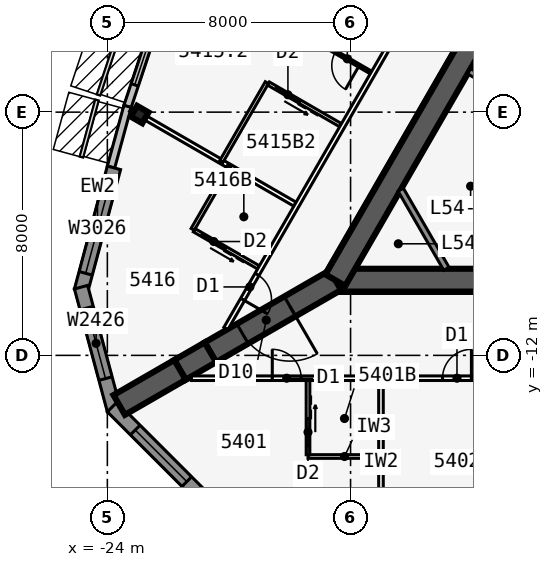
"""IFC4 building model, lengths in metres.
Left out: names, types, materials, properties, quantities, classifications, styles, units other than length and angle.
Written with IfcOpenShell. Run it as: python <this file> out.ifc"""

import sys

from ifc_helpers import new_model, si_unit, direction, frame, frame_2d, origin, origin_2d, place, context, subcontext, project, spatial, polyline, rectangle, i_section, outline, extrude, element, fill, save


model = new_model("IFC4")
c1 = context("Model", 3, precision=1e-05, world=origin(), true_north=direction((0.0, 1.0)))
c2 = subcontext(c1, "Body", "Model", "MODEL_VIEW")
j1 = project(units=[si_unit("LENGTHUNIT", "METRE"), si_unit("PLANEANGLEUNIT", "RADIAN")], contexts=[c1])
p1 = place(None, origin())
s1 = spatial("IfcSite", under=j1, at=p1, CompositionType="ELEMENT")
p2 = place(p1, origin())
s2 = spatial("IfcBuilding", under=s1, at=p2, CompositionType="ELEMENT")
p3 = place(p2, frame((0.0, 0.0, 204.5)))
s3 = spatial("IfcBuildingStorey", under=s2, at=p3, CompositionType="ELEMENT", Elevation=204.5)
p4 = place(p3, frame((-16.5, -9.526, 0.0), z_axis=(0.0, 0.0, 1.0), x_axis=(1.0, 0.0, 0.0)))
e1 = element("IfcWall", 1, at=p4, inside=s3, PredefinedType="SHEAR", context=c2, shape_type="SweptSolid", body=[
    extrude(rectangle(XDim=33.0, YDim=0.75, at=frame_2d((16.5, 0.0))), origin(), (0.0, 0.0, 1.0), 3.6),
])
p5 = place(p4, frame((14.05, 0.0, 0.0)))
e2 = element("IfcOpeningElement", 2, at=p5, cuts=e1, PredefinedType="OPENING", context=c2, shape_type="SweptSolid", body=[
    extrude(rectangle(XDim=1.8, YDim=2.13, at=frame_2d((0.9, 1.065))), frame((0.0, 0.385, 0.0), z_axis=(0.0, -1.0, 0.0), x_axis=(1.0, 0.0, 0.0)), (0.0, 0.0, 1.0), 0.77),
])
p6 = place(p3, frame((0.0, 19.052, 0.0), z_axis=(0.0, 0.0, 1.0), x_axis=(-0.499999749417, -0.866025548458, 0.0)))
e3 = element("IfcWall", 3, at=p6, inside=s3, PredefinedType="SHEAR", context=c2, shape_type="SweptSolid", body=[
    extrude(rectangle(XDim=33.0, YDim=0.75, at=frame_2d((16.5, 0.0))), origin(), (0.0, 0.0, 1.0), 3.6),
])
p7 = place(p6, frame((14.15, 0.0, 0.0)))
e4 = element("IfcOpeningElement", 4, at=p7, cuts=e3, PredefinedType="OPENING", context=c2, shape_type="SweptSolid", body=[
    extrude(rectangle(XDim=1.8, YDim=2.13, at=frame_2d((0.9, 1.065))), frame((0.0, 0.385, 0.0), z_axis=(0.0, -1.0, 0.0), x_axis=(1.0, 0.0, 0.0)), (0.0, 0.0, 1.0), 0.77),
])
p8 = place(p6, frame((12.6, 0.0, 0.0)))
e5 = element("IfcOpeningElement", 5, at=p8, cuts=e3, PredefinedType="OPENING", context=c2, shape_type="SweptSolid", body=[
    extrude(rectangle(XDim=1.0, YDim=2.13, at=frame_2d((0.5, 1.065))), frame((0.0, 0.385, 0.0), z_axis=(0.0, -1.0, 0.0), x_axis=(1.0, 0.0, 0.0)), (0.0, 0.0, 1.0), 0.77),
])
p9 = place(p3, frame((-9.329, -4.256, 0.0), z_axis=(0.0, 0.0, 1.0), x_axis=(-0.866022944154, 0.50000426018, 0.0)))
e6 = element("IfcWall", 6, at=p9, inside=s3, PredefinedType="SOLIDWALL", context=c2, shape_type="SweptSolid", body=[
    extrude(rectangle(XDim=3.2, YDim=0.2, at=frame_2d((1.6, 0.0))), origin(), (0.0, 0.0, 1.0), 3.435),
])
p10 = place(p3, frame((-16.5, -9.526, 0.0), z_axis=(0.0, 0.0, 1.0), x_axis=(-0.866031398331, -0.499989616998, 0.0)))
e7 = element("IfcWall", 7, at=p10, inside=s3, PredefinedType="SHEAR", context=c2, shape_type="SweptSolid", body=[
    extrude(rectangle(XDim=4.746, YDim=0.75, at=frame_2d((2.373, 0.0))), origin(), (0.0, 0.0, 1.0), 3.6),
])
p11 = place(p10, frame((1.725, 0.0, 0.0)))
e8 = element("IfcOpeningElement", 8, at=p11, cuts=e7, PredefinedType="OPENING", context=c2, shape_type="SweptSolid", body=[
    extrude(rectangle(XDim=1.8, YDim=2.13, at=frame_2d((0.9, 1.065))), frame((0.0, 0.385, 0.0), z_axis=(0.0, -1.0, 0.0), x_axis=(1.0, 0.0, 0.0)), (0.0, 0.0, 1.0), 0.77),
])
p12 = place(p3, frame((-20.61, -11.899, 0.0), z_axis=(0.0, 0.0, 1.0), x_axis=(-0.866009537788, -0.500027479704, 0.0)))
e9 = element("IfcWall", 9, at=p12, inside=s3, PredefinedType="SHEAR", context=c2, shape_type="SweptSolid", body=[
    extrude(rectangle(XDim=1.155, YDim=0.75, at=frame_2d((0.577, 0.0))), origin(), (0.0, 0.0, 1.0), 3.6),
])
p13 = place(p3, frame((-21.61, -12.477, 0.0), z_axis=(0.0, 0.0, 1.0), x_axis=(-0.866055313784, -0.499948190782, 0.0)))
e10 = element("IfcWall", 10, at=p13, inside=s3, PredefinedType="SHEAR", context=c2, shape_type="SweptSolid", body=[
    extrude(rectangle(XDim=2.309, YDim=0.75, at=frame_2d((1.155, 0.0))), origin(), (0.0, 0.0, 1.0), 3.6),
])
p14 = place(p3, frame((-22.937, -4.078, 0.0), z_axis=(0.0, 0.0, 1.0), x_axis=(-0.5, -0.866025403784, 0.0)))
e11 = element("IfcColumn", 11, at=p14, inside=s3, PredefinedType="COLUMN", context=c2, shape_type="SweptSolid", body=[
    extrude(i_section(OverallWidth=0.411, OverallDepth=0.434, WebThickness=0.036, FlangeThickness=0.057, at=origin_2d()), origin(), (0.0, 0.0, 1.0), 3.6),
])
p15 = place(p3, frame((-21.729, 1.028, 0.0), z_axis=(0.0, 0.0, 1.0), x_axis=(-0.315108478109, -0.949055660656, 0.0)))
e12 = element("IfcWall", 12, at=p15, inside=s3, PredefinedType="STANDARD", context=c2, shape_type="SweptSolid", body=[
    extrude(rectangle(XDim=5.105, YDim=0.25, at=frame_2d((2.552, 0.0))), origin(), (0.0, 0.0, 1.0), 3.435),
])
p16 = place(p15, frame((0.752, 0.0, 0.45)))
e13 = element("IfcOpeningElement", 13, at=p16, cuts=e12, PredefinedType="OPENING", context=c2, shape_type="SweptSolid", body=[
    extrude(rectangle(XDim=3.6, YDim=2.6, at=frame_2d((1.8, 1.3))), frame((0.0, 0.135, 0.0), z_axis=(0.0, -1.0, 0.0), x_axis=(1.0, 0.0, 0.0)), (0.0, 0.0, 1.0), 0.27),
])
p17 = place(p3, frame((-23.336, -3.811, 0.0), z_axis=(0.0, 0.0, 1.0), x_axis=(-0.262867703986, -0.964831887015, 0.0)))
e14 = element("IfcWall", 14, at=p17, inside=s3, PredefinedType="STANDARD", context=c2, shape_type="SweptSolid", body=[
    extrude(rectangle(XDim=2.068, YDim=0.25, at=frame_2d((1.034, 0.0))), origin(), (0.0, 0.0, 1.0), 3.435),
])
p18 = place(p3, frame((-23.783, -5.832, 0.0), z_axis=(0.0, 0.0, 1.0), x_axis=(-0.258784695888, -0.965935029479, 0.0)))
e15 = element("IfcWall", 15, at=p18, inside=s3, PredefinedType="SOLIDWALL", context=c2, shape_type="SweptSolid", body=[
    extrude(rectangle(XDim=4.184, YDim=0.45, at=frame_2d((2.092, 0.0))), origin(), (0.0, 0.0, 1.0), 3.435),
])
p19 = place(p18, frame((0.592, 0.0, 0.45)))
e16 = element("IfcOpeningElement", 16, at=p19, cuts=e15, PredefinedType="OPENING", context=c2, shape_type="SweptSolid", body=[
    extrude(rectangle(XDim=3.0, YDim=2.6, at=frame_2d((1.5, 1.3))), frame((0.0, 0.235, 0.0), z_axis=(0.0, -1.0, 0.0), x_axis=(1.0, 0.0, 0.0)), (0.0, 0.0, 1.0), 0.47),
])
p20 = place(p3, frame((-24.865, -9.757, 0.0), z_axis=(0.0, 0.0, 1.0), x_axis=(0.258799282522, -0.96593112144, 0.0)))
e17 = element("IfcWall", 17, at=p20, inside=s3, PredefinedType="SOLIDWALL", context=c2, shape_type="SweptSolid", body=[
    extrude(outline(polyline([(4.184, 0.225), (4.125, 0.225), (3.705, 0.113), (3.675, 0.225), (0.0, 0.225), (0.0, -0.225), (4.184, -0.225), (4.184, 0.225)])), origin(), (0.0, 0.0, 1.0), 3.435),
])
p21 = place(p20, frame((0.713, 0.0, 0.45)))
e18 = element("IfcOpeningElement", 18, at=p21, cuts=e17, PredefinedType="OPENING", context=c2, shape_type="SweptSolid", body=[
    extrude(rectangle(XDim=2.4, YDim=2.6, at=frame_2d((1.2, 1.3))), frame((0.0, 0.235, 0.0), z_axis=(0.0, -1.0, 0.0), x_axis=(1.0, 0.0, 0.0)), (0.0, 0.0, 1.0), 0.47),
])
p22 = place(p3, frame((-23.841, -13.697, 0.0), z_axis=(0.0, 0.0, 1.0), x_axis=(0.707077605902, -0.707135955267, 0.0)))
e19 = element("IfcWall", 19, at=p22, inside=s3, PredefinedType="SOLIDWALL", context=c2, shape_type="SweptSolid", body=[
    extrude(outline(polyline([(4.184, 0.225), (0.509, 0.225), (0.479, 0.113), (0.059, 0.225), (0.0, 0.225), (0.0, -0.225), (4.184, -0.225), (4.184, 0.225)])), origin(), (0.0, 0.0, 1.0), 3.435),
])
p23 = place(p22, frame((1.071, 0.0, 0.45)))
e20 = element("IfcOpeningElement", 20, at=p23, cuts=e19, PredefinedType="OPENING", context=c2, shape_type="SweptSolid", body=[
    extrude(rectangle(XDim=2.4, YDim=2.6, at=frame_2d((1.2, 1.3))), frame((0.0, 0.235, 0.0), z_axis=(0.0, -1.0, 0.0), x_axis=(1.0, 0.0, 0.0)), (0.0, 0.0, 1.0), 0.47),
])
p24 = place(p3, frame((-21.236, -12.751, 0.0), z_axis=(0.0, 0.0, 1.0), x_axis=(1.0, 0.0, 0.0)))
e21 = element("IfcWall", 21, at=p24, inside=s3, PredefinedType="PARTITIONING", context=c2, shape_type="SweptSolid", body=[
    extrude(rectangle(XDim=42.472, YDim=0.15, at=frame_2d((21.236, 0.0))), origin(), (0.0, 0.0, 1.0), 3.435),
])
p25 = place(p24, frame((2.661, 0.0, 0.0)))
e22 = element("IfcOpeningElement", 22, at=p25, cuts=e21, PredefinedType="OPENING", context=c2, shape_type="SweptSolid", body=[
    extrude(rectangle(XDim=0.95, YDim=2.13, at=frame_2d((0.475, 1.065))), frame((0.0, 0.085, 0.0), z_axis=(0.0, -1.0, 0.0), x_axis=(1.0, 0.0, 0.0)), (0.0, 0.0, 1.0), 0.17),
])
p26 = place(p24, frame((8.261, 0.0, 0.0)))
e23 = element("IfcOpeningElement", 23, at=p26, cuts=e21, PredefinedType="OPENING", context=c2, shape_type="SweptSolid", body=[
    extrude(rectangle(XDim=0.95, YDim=2.13, at=frame_2d((0.475, 1.065))), frame((0.0, 0.085, 0.0), z_axis=(0.0, -1.0, 0.0), x_axis=(1.0, 0.0, 0.0)), (0.0, 0.0, 1.0), 0.17),
])
p27 = place(p24, frame((18.861, 0.0, 0.0)))
e24 = element("IfcOpeningElement", 24, at=p27, cuts=e21, PredefinedType="OPENING", context=c2, shape_type="SweptSolid", body=[
    extrude(rectangle(XDim=0.95, YDim=2.13, at=frame_2d((0.475, 1.065))), frame((0.0, 0.085, 0.0), z_axis=(0.0, -1.0, 0.0), x_axis=(1.0, 0.0, 0.0)), (0.0, 0.0, 1.0), 0.17),
])
p28 = place(p24, frame((23.236, 0.0, 0.0)))
e25 = element("IfcOpeningElement", 25, at=p28, cuts=e21, PredefinedType="OPENING", context=c2, shape_type="SweptSolid", body=[
    extrude(rectangle(XDim=1.0, YDim=2.13, at=frame_2d((0.5, 1.065))), frame((0.0, 0.085, 0.0), z_axis=(0.0, -1.0, 0.0), x_axis=(1.0, 0.0, 0.0)), (0.0, 0.0, 1.0), 0.17),
])
p29 = place(p24, frame((29.461, 0.0, 0.0)))
e26 = element("IfcOpeningElement", 26, at=p29, cuts=e21, PredefinedType="OPENING", context=c2, shape_type="SweptSolid", body=[
    extrude(rectangle(XDim=0.95, YDim=2.13, at=frame_2d((0.475, 1.065))), frame((0.0, 0.085, 0.0), z_axis=(0.0, -1.0, 0.0), x_axis=(1.0, 0.0, 0.0)), (0.0, 0.0, 1.0), 0.17),
])
p30 = place(p24, frame((38.861, 0.0, 0.0)))
e27 = element("IfcOpeningElement", 27, at=p30, cuts=e21, PredefinedType="OPENING", context=c2, shape_type="SweptSolid", body=[
    extrude(rectangle(XDim=0.95, YDim=2.13, at=frame_2d((0.475, 1.065))), frame((0.0, 0.085, 0.0), z_axis=(0.0, -1.0, 0.0), x_axis=(1.0, 0.0, 0.0)), (0.0, 0.0, 1.0), 0.17),
])
p31 = place(p3, frame((-15.0, -12.826, 0.0), z_axis=(0.0, 0.0, 1.0), x_axis=(0.0, -1.0, 0.0)))
e28 = element("IfcWall", 28, at=p31, inside=s3, PredefinedType="PARTITIONING", context=c2, shape_type="SweptSolid", body=[
    extrude(rectangle(XDim=5.34, YDim=0.15, at=frame_2d((2.67, 0.0))), origin(), (0.0, 0.0, 1.0), 2.589),
])
p32 = place(p3, frame((-17.4, -15.326, 0.0), z_axis=(0.0, 0.0, 1.0), x_axis=(1.0, 0.0, 0.0)))
e29 = element("IfcWall", 29, at=p32, inside=s3, PredefinedType="PLUMBINGWALL", context=c2, shape_type="SweptSolid", body=[
    extrude(rectangle(XDim=2.4, YDim=0.12, at=frame_2d((1.2, 0.0))), origin(), (0.0, 0.0, 1.0), 3.435),
])
p33 = place(p3, frame((-17.4, -12.826, 0.0), z_axis=(0.0, 0.0, 1.0), x_axis=(0.0, -1.0, 0.0)))
e30 = element("IfcWall", 30, at=p33, inside=s3, PredefinedType="PLUMBINGWALL", context=c2, shape_type="SweptSolid", body=[
    extrude(rectangle(XDim=2.44, YDim=0.12, at=frame_2d((1.22, 0.0))), origin(), (0.0, 0.0, 1.0), 3.435),
])
p34 = place(p33, frame((1.25, 0.0, 0.0)))
e31 = element("IfcOpeningElement", 31, at=p34, cuts=e30, PredefinedType="OPENING", context=c2, shape_type="SweptSolid", body=[
    extrude(rectangle(XDim=0.9, YDim=2.13, at=frame_2d((0.45, 1.065))), frame((0.0, 0.07, 0.0), z_axis=(0.0, -1.0, 0.0), x_axis=(1.0, 0.0, 0.0)), (0.0, 0.0, 1.0), 0.14),
])
p35 = place(p3, frame((-0.425, 22.966, 0.0), z_axis=(0.0, 0.0, 1.0), x_axis=(-0.500000265775, -0.866025250339, 0.0)))
e32 = element("IfcWall", 32, at=p35, inside=s3, PredefinedType="PARTITIONING", context=c2, shape_type="SweptSolid", body=[
    extrude(rectangle(XDim=39.354, YDim=0.15, at=frame_2d((19.677, 0.0))), origin(), (0.0, 0.0, 1.0), 3.435),
])
p36 = place(p35, frame((1.102, 0.0, 0.0)))
e33 = element("IfcOpeningElement", 33, at=p36, cuts=e32, PredefinedType="OPENING", context=c2, shape_type="SweptSolid", body=[
    extrude(rectangle(XDim=0.95, YDim=2.13, at=frame_2d((0.475, 1.065))), frame((0.0, 0.085, 0.0), z_axis=(0.0, -1.0, 0.0), x_axis=(1.0, 0.0, 0.0)), (0.0, 0.0, 1.0), 0.17),
])
p37 = place(p35, frame((7.902, 0.0, 0.0)))
e34 = element("IfcOpeningElement", 34, at=p37, cuts=e32, PredefinedType="OPENING", context=c2, shape_type="SweptSolid", body=[
    extrude(rectangle(XDim=0.95, YDim=2.13, at=frame_2d((0.475, 1.065))), frame((0.0, 0.085, 0.0), z_axis=(0.0, -1.0, 0.0), x_axis=(1.0, 0.0, 0.0)), (0.0, 0.0, 1.0), 0.17),
])
p38 = place(p35, frame((17.302, 0.0, 0.0)))
e35 = element("IfcOpeningElement", 35, at=p38, cuts=e32, PredefinedType="OPENING", context=c2, shape_type="SweptSolid", body=[
    extrude(rectangle(XDim=0.95, YDim=2.13, at=frame_2d((0.475, 1.065))), frame((0.0, 0.085, 0.0), z_axis=(0.0, -1.0, 0.0), x_axis=(1.0, 0.0, 0.0)), (0.0, 0.0, 1.0), 0.17),
])
p39 = place(p35, frame((26.702, 0.0, 0.0)))
e36 = element("IfcOpeningElement", 36, at=p39, cuts=e32, PredefinedType="OPENING", context=c2, shape_type="SweptSolid", body=[
    extrude(rectangle(XDim=0.95, YDim=2.13, at=frame_2d((0.475, 1.065))), frame((0.0, 0.085, 0.0), z_axis=(0.0, -1.0, 0.0), x_axis=(1.0, 0.0, 0.0)), (0.0, 0.0, 1.0), 0.17),
])
p40 = place(p35, frame((37.302, 0.0, 0.0)))
e37 = element("IfcOpeningElement", 37, at=p40, cuts=e32, PredefinedType="OPENING", context=c2, shape_type="SweptSolid", body=[
    extrude(rectangle(XDim=0.95, YDim=2.13, at=frame_2d((0.475, 1.065))), frame((0.0, 0.085, 0.0), z_axis=(0.0, -1.0, 0.0), x_axis=(1.0, 0.0, 0.0)), (0.0, 0.0, 1.0), 0.17),
])
p41 = place(p3, frame((-15.329, -2.697, 0.0), z_axis=(0.0, 0.0, 1.0), x_axis=(-0.866032413668, 0.499987858329, 0.0)))
e38 = element("IfcWall", 38, at=p41, inside=s3, PredefinedType="PARTITIONING", context=c2, shape_type="SweptSolid", body=[
    extrude(rectangle(XDim=7.273, YDim=0.1, at=frame_2d((3.636, 0.0))), origin(), (0.0, 0.0, 1.0), 2.589),
])
p42 = place(p41, frame((0.45, 0.0, 0.0)))
e39 = element("IfcOpeningElement", 39, at=p42, cuts=e38, PredefinedType="OPENING", context=c2, shape_type="SweptSolid", body=[
    extrude(rectangle(XDim=0.9, YDim=2.13, at=frame_2d((0.45, 1.065))), frame((0.0, 0.06, 0.0), z_axis=(0.0, -1.0, 0.0), x_axis=(1.0, 0.0, 0.0)), (0.0, 0.0, 1.0), 0.12),
])
p43 = place(p3, frame((-17.829, -7.027, 0.0), z_axis=(0.0, 0.0, 1.0), x_axis=(-0.866026604282, 0.499997920671, 0.0)))
e40 = element("IfcWall", 40, at=p43, inside=s3, PredefinedType="PARTITIONING", context=c2, shape_type="SweptSolid", body=[
    extrude(rectangle(XDim=6.24, YDim=0.15, at=frame_2d((3.12, 0.0))), origin(), (0.0, 0.0, 1.0), 2.589),
])
p44 = place(p3, frame((-18.753, -3.029, 0.0), z_axis=(0.0, 0.0, 1.0), x_axis=(-0.50002537861, -0.866010750942, 0.0)))
e41 = element("IfcWall", 41, at=p44, inside=s3, PredefinedType="PLUMBINGWALL", context=c2, shape_type="SweptSolid", body=[
    extrude(rectangle(XDim=3.0, YDim=0.12, at=frame_2d((1.5, 0.0))), origin(), (0.0, 0.0, 1.0), 3.435),
])
p45 = place(p3, frame((-16.329, -4.429, 0.0), z_axis=(0.0, 0.0, 1.0), x_axis=(-0.865997131366, 0.500048966069, 0.0)))
e42 = element("IfcWall", 42, at=p45, inside=s3, PredefinedType="PLUMBINGWALL", context=c2, shape_type="SweptSolid", body=[
    extrude(rectangle(XDim=2.74, YDim=0.12, at=frame_2d((1.37, 0.0))), origin(), (0.0, 0.0, 1.0), 3.435),
])
p46 = place(p45, frame((1.55, 0.0, 0.0)))
e43 = element("IfcOpeningElement", 43, at=p46, cuts=e42, PredefinedType="OPENING", context=c2, shape_type="SweptSolid", body=[
    extrude(rectangle(XDim=0.9, YDim=2.13, at=frame_2d((0.45, 1.065))), frame((0.0, 0.07, 0.0), z_axis=(0.0, -1.0, 0.0), x_axis=(1.0, 0.0, 0.0)), (0.0, 0.0, 1.0), 0.14),
])
p47 = place(p3, frame((-19.993, -5.777, 0.0), z_axis=(0.0, 0.0, 1.0), x_axis=(-0.500033551112, -0.866006032174, 0.0)))
e44 = element("IfcWall", 44, at=p47, inside=s3, PredefinedType="PLUMBINGWALL", context=c2, shape_type="SweptSolid", body=[
    extrude(rectangle(XDim=2.4, YDim=0.12, at=frame_2d((1.2, 0.0))), origin(), (0.0, 0.0, 1.0), 3.435),
])
p48 = place(p3, frame((-19.029, -9.106, 0.0), z_axis=(0.0, 0.0, 1.0), x_axis=(-0.866023955769, 0.500002508028, 0.0)))
e45 = element("IfcWall", 45, at=p48, inside=s3, PredefinedType="PLUMBINGWALL", context=c2, shape_type="SweptSolid", body=[
    extrude(rectangle(XDim=2.44, YDim=0.12, at=frame_2d((1.22, 0.0))), origin(), (0.0, 0.0, 1.0), 3.435),
])
p49 = place(p48, frame((1.25, 0.0, 0.0)))
e46 = element("IfcOpeningElement", 46, at=p49, cuts=e45, PredefinedType="OPENING", context=c2, shape_type="SweptSolid", body=[
    extrude(rectangle(XDim=0.9, YDim=2.13, at=frame_2d((0.45, 1.065))), frame((0.0, 0.07, 0.0), z_axis=(0.0, -1.0, 0.0), x_axis=(1.0, 0.0, 0.0)), (0.0, 0.0, 1.0), 0.14),
])
p50 = place(p3, frame((-12.848, -9.151, 0.0), z_axis=(0.0, 0.0, 1.0), x_axis=(-0.499952404951, 0.866052881055, 0.0)))
e47 = element("IfcWall", 47, at=p50, inside=s3, PredefinedType="SOLIDWALL", context=c2, shape_type="SweptSolid", body=[
    extrude(rectangle(XDim=3.002, YDim=0.2, at=frame_2d((1.501, 0.0))), origin(), (0.0, 0.0, 1.0), 3.435),
])
p51 = place(p16, origin())
e48 = element("IfcWindow", 48, at=p51, inside=s3, PartitioningType="SINGLE_PANEL", PredefinedType="WINDOW", context=c2, shape_type="SweptSolid", body=[
    extrude(rectangle(XDim=3.6, YDim=2.6, at=frame_2d((1.8, 1.3))), frame((0.0, 0.03, 0.0), z_axis=(0.0, -1.0, 0.0), x_axis=(1.0, 0.0, 0.0)), (0.0, 0.0, 1.0), 0.06),
])
fill(e13, e48)
p52 = place(p19, origin())
e49 = element("IfcWindow", 49, at=p52, inside=s3, PartitioningType="SINGLE_PANEL", PredefinedType="WINDOW", context=c2, shape_type="SweptSolid", body=[
    extrude(rectangle(XDim=3.0, YDim=2.6, at=frame_2d((1.5, 1.3))), frame((0.0, 0.03, 0.0), z_axis=(0.0, -1.0, 0.0), x_axis=(1.0, 0.0, 0.0)), (0.0, 0.0, 1.0), 0.06),
])
fill(e16, e49)
p53 = place(p21, origin())
e50 = element("IfcWindow", 50, at=p53, inside=s3, PartitioningType="SINGLE_PANEL", PredefinedType="WINDOW", context=c2, shape_type="SweptSolid", body=[
    extrude(rectangle(XDim=2.4, YDim=2.6, at=frame_2d((1.2, 1.3))), frame((0.0, 0.03, 0.0), z_axis=(0.0, -1.0, 0.0), x_axis=(1.0, 0.0, 0.0)), (0.0, 0.0, 1.0), 0.06),
])
fill(e18, e50)
p54 = place(p23, origin())
e51 = element("IfcWindow", 51, at=p54, inside=s3, PartitioningType="SINGLE_PANEL", PredefinedType="WINDOW", context=c2, shape_type="SweptSolid", body=[
    extrude(rectangle(XDim=2.4, YDim=2.6, at=frame_2d((1.2, 1.3))), frame((0.0, 0.03, 0.0), z_axis=(0.0, -1.0, 0.0), x_axis=(1.0, 0.0, 0.0)), (0.0, 0.0, 1.0), 0.06),
])
fill(e20, e51)
p55 = place(p34, origin())
e52 = element("IfcDoor", 52, at=p55, inside=s3, OperationType="SLIDING_TO_LEFT", PredefinedType="DOOR", context=c2, shape_type="SweptSolid", body=[
    extrude(rectangle(XDim=0.9, YDim=2.13, at=frame_2d((0.45, 1.065))), frame((0.0, 0.025, 0.0), z_axis=(0.0, -1.0, 0.0), x_axis=(1.0, 0.0, 0.0)), (0.0, 0.0, 1.0), 0.05),
])
fill(e31, e52)
p56 = place(p25, origin())
e53 = element("IfcDoor", 53, at=p56, inside=s3, OperationType="SINGLE_SWING_LEFT", PredefinedType="DOOR", context=c2, shape_type="SweptSolid", body=[
    extrude(rectangle(XDim=0.95, YDim=2.13, at=frame_2d((0.475, 1.065))), frame((0.0, 0.025, 0.0), z_axis=(0.0, -1.0, 0.0), x_axis=(1.0, 0.0, 0.0)), (0.0, 0.0, 1.0), 0.05),
])
fill(e22, e53)
p57 = place(p26, origin())
e54 = element("IfcDoor", 54, at=p57, inside=s3, OperationType="SINGLE_SWING_RIGHT", PredefinedType="DOOR", context=c2, shape_type="SweptSolid", body=[
    extrude(rectangle(XDim=0.95, YDim=2.13, at=frame_2d((0.475, 1.065))), frame((0.0, 0.025, 0.0), z_axis=(0.0, -1.0, 0.0), x_axis=(1.0, 0.0, 0.0)), (0.0, 0.0, 1.0), 0.05),
])
fill(e23, e54)
p58 = place(p42, origin())
e55 = element("IfcDoor", 55, at=p58, inside=s3, OperationType="SINGLE_SWING_LEFT", PredefinedType="DOOR", context=c2, shape_type="SweptSolid", body=[
    extrude(rectangle(XDim=0.9, YDim=2.13, at=frame_2d((0.45, 1.065))), frame((0.0, 0.025, 0.0), z_axis=(0.0, -1.0, 0.0), x_axis=(1.0, 0.0, 0.0)), (0.0, 0.0, 1.0), 0.05),
])
fill(e39, e55)
p59 = place(p46, origin())
e56 = element("IfcDoor", 56, at=p59, inside=s3, OperationType="SLIDING_TO_LEFT", PredefinedType="DOOR", context=c2, shape_type="SweptSolid", body=[
    extrude(rectangle(XDim=0.9, YDim=2.13, at=frame_2d((0.45, 1.065))), frame((0.0, 0.025, 0.0), z_axis=(0.0, -1.0, 0.0), x_axis=(1.0, 0.0, 0.0)), (0.0, 0.0, 1.0), 0.05),
])
fill(e43, e56)
p60 = place(p49, origin())
e57 = element("IfcDoor", 57, at=p60, inside=s3, OperationType="SLIDING_TO_LEFT", PredefinedType="DOOR", context=c2, shape_type="SweptSolid", body=[
    extrude(rectangle(XDim=0.9, YDim=2.13, at=frame_2d((0.45, 1.065))), frame((0.0, 0.025, 0.0), z_axis=(0.0, -1.0, 0.0), x_axis=(1.0, 0.0, 0.0)), (0.0, 0.0, 1.0), 0.05),
])
fill(e46, e57)
p61 = place(p40, origin())
e58 = element("IfcDoor", 58, at=p61, inside=s3, OperationType="SINGLE_SWING_RIGHT", PredefinedType="DOOR", context=c2, shape_type="SweptSolid", body=[
    extrude(rectangle(XDim=0.95, YDim=2.13, at=frame_2d((0.475, 1.065))), frame((0.0, 0.025, 0.0), z_axis=(0.0, -1.0, 0.0), x_axis=(1.0, 0.0, 0.0)), (0.0, 0.0, 1.0), 0.05),
])
fill(e37, e58)
p62 = place(p11, origin())
e59 = element("IfcDoor", 59, at=p62, inside=s3, OperationType="DOUBLE_DOOR_DOUBLE_SWING", PredefinedType="DOOR", context=c2, shape_type="SweptSolid", body=[
    extrude(rectangle(XDim=1.8, YDim=2.13, at=frame_2d((0.9, 1.065))), frame((0.0, 0.025, 0.0), z_axis=(0.0, -1.0, 0.0), x_axis=(1.0, 0.0, 0.0)), (0.0, 0.0, 1.0), 0.05),
])
fill(e8, e59)
save(model, sys.argv[1])
